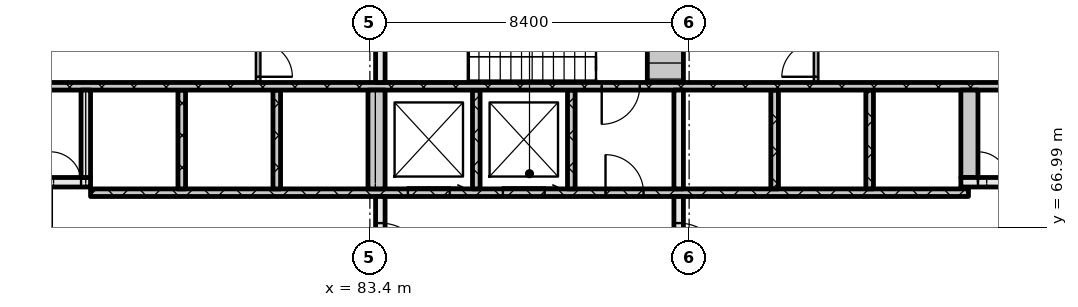
"""IFC4 building model, lengths in metres.
Left out: names, types, materials, properties, quantities, classifications, styles, units other than length and angle.
Written with IfcOpenShell. Run it as: python <this file> out.ifc"""

import sys

from ifc_helpers import new_model, si_unit, direction, frame, frame_2d, origin, place, context, subcontext, project, spatial, rectangle, extrude, element, fill, save


model = new_model("IFC4")
c1 = context("Model", 3, precision=1e-05, world=origin(), true_north=direction((0.0, 1.0)))
c2 = subcontext(c1, "Body", "Model", "MODEL_VIEW")
j1 = project(units=[si_unit("LENGTHUNIT", "METRE"), si_unit("PLANEANGLEUNIT", "RADIAN")], contexts=[c1])
p1 = place(None, origin())
s1 = spatial("IfcSite", under=j1, at=p1, CompositionType="ELEMENT")
p2 = place(p1, origin())
s2 = spatial("IfcBuilding", under=s1, at=p2, CompositionType="ELEMENT")
p3 = place(p2, frame((0.0, 0.0, 14.4)))
s3 = spatial("IfcBuildingStorey", under=s2, at=p3, CompositionType="ELEMENT", Elevation=14.4)
p4 = place(p3, frame((83.675, 65.2, 0.0), z_axis=(0.0, 0.0, 1.0), x_axis=(0.0, 1.0, 0.0)))
e1 = element("IfcWall", 1, at=p4, inside=s3, PredefinedType="SOLIDWALL", context=c2, shape_type="SweptSolid", body=[
    extrude(rectangle(XDim=2.6, YDim=0.25, at=frame_2d((1.3, 0.0))), origin(), (0.0, 0.0, 1.0), 4.5),
])
p5 = place(p4, frame((0.7, 0.0, 0.0)))
e2 = element("IfcOpeningElement", 2, at=p5, cuts=e1, PredefinedType="OPENING", context=c2, shape_type="SweptSolid", body=[
    extrude(rectangle(XDim=1.2, YDim=2.1, at=frame_2d((0.6, 1.05))), frame((0.0, 0.135, 0.0), z_axis=(0.0, -1.0, 0.0), x_axis=(1.0, 0.0, 0.0)), (0.0, 0.0, 1.0), 0.27),
])
p6 = place(p3, frame((91.525, 65.2, 0.0), z_axis=(0.0, 0.0, 1.0), x_axis=(0.0, 1.0, 0.0)))
e3 = element("IfcWall", 3, at=p6, inside=s3, PredefinedType="SOLIDWALL", context=c2, shape_type="SweptSolid", body=[
    extrude(rectangle(XDim=2.6, YDim=0.25, at=frame_2d((1.3, 0.0))), origin(), (0.0, 0.0, 1.0), 4.5),
])
p7 = place(p6, frame((0.7, 0.0, 0.0)))
e4 = element("IfcOpeningElement", 4, at=p7, cuts=e3, PredefinedType="OPENING", context=c2, shape_type="SweptSolid", body=[
    extrude(rectangle(XDim=1.2, YDim=2.1, at=frame_2d((0.6, 1.05))), frame((0.0, 0.135, 0.0), z_axis=(0.0, -1.0, 0.0), x_axis=(1.0, 0.0, 0.0)), (0.0, 0.0, 1.0), 0.27),
])
p8 = place(p3, frame((76.05, 67.9, 0.0), z_axis=(0.0, 0.0, 1.0), x_axis=(1.0, 0.0, 0.0)))
e5 = element("IfcWall", 5, at=p8, inside=s3, PredefinedType="SOLIDWALL", context=c2, shape_type="SweptSolid", body=[
    extrude(rectangle(XDim=23.1, YDim=0.2, at=frame_2d((11.55, 0.0))), origin(), (0.0, 0.0, 1.0), 4.5),
])
p9 = place(p8, frame((8.35, 0.0, 0.0)))
e6 = element("IfcOpeningElement", 6, at=p9, cuts=e5, PredefinedType="OPENING", context=c2, shape_type="SweptSolid", body=[
    extrude(rectangle(XDim=1.1, YDim=2.1, at=frame_2d((0.55, 1.05))), frame((0.0, 0.11, 0.0), z_axis=(0.0, -1.0, 0.0), x_axis=(1.0, 0.0, 0.0)), (0.0, 0.0, 1.0), 0.22),
])
p10 = place(p8, frame((10.85, 0.0, 0.0)))
e7 = element("IfcOpeningElement", 7, at=p10, cuts=e5, PredefinedType="OPENING", context=c2, shape_type="SweptSolid", body=[
    extrude(rectangle(XDim=1.1, YDim=2.1, at=frame_2d((0.55, 1.05))), frame((0.0, 0.11, 0.0), z_axis=(0.0, -1.0, 0.0), x_axis=(1.0, 0.0, 0.0)), (0.0, 0.0, 1.0), 0.22),
])
p11 = place(p8, frame((13.55, 0.0, 0.0)))
e8 = element("IfcOpeningElement", 8, at=p11, cuts=e5, PredefinedType="OPENING", context=c2, shape_type="SweptSolid", body=[
    extrude(rectangle(XDim=1.0, YDim=2.1, at=frame_2d((0.5, 1.05))), frame((0.0, 0.11, 0.0), z_axis=(0.0, -1.0, 0.0), x_axis=(1.0, 0.0, 0.0)), (0.0, 0.0, 1.0), 0.22),
])
for number, where, z_axis, x_axis in (
    (9, (78.45, 68.0, 0.0), (0.0, 0.0, 1.0), (0.0, 1.0, 0.0)),
    (10, (80.95, 68.0, 0.0), (0.0, 0.0, 1.0), (0.0, 1.0, 0.0)),
):
    element("IfcWall", number, at=place(p3, frame(where, z_axis=z_axis, x_axis=x_axis)), inside=s3, PredefinedType="SOLIDWALL", context=c2, shape_type="SweptSolid", body=[
        extrude(rectangle(XDim=2.6, YDim=0.2, at=frame_2d((1.3, 0.0))), origin(), (0.0, 0.0, 1.0), 4.5),
    ])
p12 = place(p3, frame((83.575, 68.0, 0.0), z_axis=(0.0, 0.0, 1.0), x_axis=(0.0, 1.0, 0.0)))
e11 = element("IfcWall", 11, at=p12, inside=s3, PredefinedType="SOLIDWALL", context=c2, shape_type="SweptSolid", body=[
    extrude(rectangle(XDim=2.6, YDim=0.45, at=frame_2d((1.3, 0.0))), origin(), (0.0, 0.0, 1.0), 4.5),
])
for number, where, z_axis, x_axis in (
    (12, (86.2, 68.0, 0.0), (0.0, 0.0, 1.0), (0.0, 1.0, 0.0)),
    (13, (88.7, 68.0, 0.0), (0.0, 0.0, 1.0), (0.0, 1.0, 0.0)),
):
    element("IfcWall", number, at=place(p3, frame(where, z_axis=z_axis, x_axis=x_axis)), inside=s3, PredefinedType="SOLIDWALL", context=c2, shape_type="SweptSolid", body=[
        extrude(rectangle(XDim=2.6, YDim=0.2, at=frame_2d((1.3, 0.0))), origin(), (0.0, 0.0, 1.0), 4.5),
    ])
p13 = place(p3, frame((91.525, 68.0, 0.0), z_axis=(0.0, 0.0, 1.0), x_axis=(0.0, 1.0, 0.0)))
e14 = element("IfcWall", 14, at=p13, inside=s3, PredefinedType="SOLIDWALL", context=c2, shape_type="SweptSolid", body=[
    extrude(rectangle(XDim=2.6, YDim=0.25, at=frame_2d((1.3, 0.0))), origin(), (0.0, 0.0, 1.0), 4.5),
])
for number, where, z_axis, x_axis in (
    (15, (94.05, 68.0, 0.0), (0.0, 0.0, 1.0), (0.0, 1.0, 0.0)),
    (16, (96.55, 68.0, 0.0), (0.0, 0.0, 1.0), (0.0, 1.0, 0.0)),
):
    element("IfcWall", number, at=place(p3, frame(where, z_axis=z_axis, x_axis=x_axis)), inside=s3, PredefinedType="SOLIDWALL", context=c2, shape_type="SweptSolid", body=[
        extrude(rectangle(XDim=2.6, YDim=0.2, at=frame_2d((1.3, 0.0))), origin(), (0.0, 0.0, 1.0), 4.5),
    ])
p14 = place(p3, frame((98.95, 68.025, 0.0), z_axis=(0.0, 0.0, 1.0), x_axis=(1.0, 0.0, 0.0)))
e17 = element("IfcWall", 17, at=p14, inside=s3, PredefinedType="SOLIDWALL", context=c2, shape_type="SweptSolid", body=[
    extrude(rectangle(XDim=0.2, YDim=0.05, at=frame_2d((0.1, 0.0))), origin(), (0.0, 0.0, 1.0), 4.5),
])
p15 = place(p3, frame((67.8, 68.175, 0.0), z_axis=(0.0, 0.0, 1.0), x_axis=(1.0, 0.0, 0.0)))
e18 = element("IfcWall", 18, at=p15, inside=s3, PredefinedType="SOLIDWALL", context=c2, shape_type="SweptSolid", body=[
    extrude(rectangle(XDim=8.25, YDim=0.25, at=frame_2d((4.125, 0.0))), origin(), (0.0, 0.0, 1.0), 4.5),
])
p16 = place(p15, frame((5.7, 0.0, 0.0)))
e19 = element("IfcOpeningElement", 19, at=p16, cuts=e18, PredefinedType="OPENING", context=c2, shape_type="SweptSolid", body=[
    extrude(rectangle(XDim=1.0, YDim=2.1, at=frame_2d((0.5, 1.05))), frame((0.0, 0.135, 0.0), z_axis=(0.0, -1.0, 0.0), x_axis=(1.0, 0.0, 0.0)), (0.0, 0.0, 1.0), 0.27),
])
p17 = place(p15, frame((7.2, 0.0, 0.0)))
e20 = element("IfcOpeningElement", 20, at=p17, cuts=e18, PredefinedType="OPENING", context=c2, shape_type="SweptSolid", body=[
    extrude(rectangle(XDim=0.8, YDim=2.1, at=frame_2d((0.4, 1.05))), frame((0.0, 0.135, 0.0), z_axis=(0.0, -1.0, 0.0), x_axis=(1.0, 0.0, 0.0)), (0.0, 0.0, 1.0), 0.27),
])
p18 = place(p3, frame((98.95, 68.175, 0.0), z_axis=(0.0, 0.0, 1.0), x_axis=(1.0, 0.0, 0.0)))
e21 = element("IfcWall", 21, at=p18, inside=s3, PredefinedType="SOLIDWALL", context=c2, shape_type="SweptSolid", body=[
    extrude(rectangle(XDim=8.45, YDim=0.25, at=frame_2d((4.225, 0.0))), origin(), (0.0, 0.0, 1.0), 4.5),
])
p19 = place(p18, frame((0.45, 0.0, 0.0)))
e22 = element("IfcOpeningElement", 22, at=p19, cuts=e21, PredefinedType="OPENING", context=c2, shape_type="SweptSolid", body=[
    extrude(rectangle(XDim=0.8, YDim=2.1, at=frame_2d((0.4, 1.05))), frame((0.0, 0.135, 0.0), z_axis=(0.0, -1.0, 0.0), x_axis=(1.0, 0.0, 0.0)), (0.0, 0.0, 1.0), 0.27),
])
p20 = place(p18, frame((1.75, 0.0, 0.0)))
e23 = element("IfcOpeningElement", 23, at=p20, cuts=e21, PredefinedType="OPENING", context=c2, shape_type="SweptSolid", body=[
    extrude(rectangle(XDim=1.0, YDim=2.1, at=frame_2d((0.5, 1.05))), frame((0.0, 0.135, 0.0), z_axis=(0.0, -1.0, 0.0), x_axis=(1.0, 0.0, 0.0)), (0.0, 0.0, 1.0), 0.27),
])
p21 = place(p3, frame((75.925, 68.3, 0.0), z_axis=(0.0, 0.0, 1.0), x_axis=(0.0, 1.0, 0.0)))
e24 = element("IfcWall", 24, at=p21, inside=s3, PredefinedType="SOLIDWALL", context=c2, shape_type="SweptSolid", body=[
    extrude(rectangle(XDim=2.3, YDim=0.25, at=frame_2d((1.15, 0.0))), origin(), (0.0, 0.0, 1.0), 4.5),
])
p22 = place(p3, frame((99.175, 68.3, 0.0), z_axis=(0.0, 0.0, 1.0), x_axis=(0.0, 1.0, 0.0)))
e25 = element("IfcWall", 25, at=p22, inside=s3, PredefinedType="SOLIDWALL", context=c2, shape_type="SweptSolid", body=[
    extrude(rectangle(XDim=2.3, YDim=0.45, at=frame_2d((1.15, 0.0))), origin(), (0.0, 0.0, 1.0), 4.5),
])
p23 = place(p3, frame((67.8, 70.7, 0.0), z_axis=(0.0, 0.0, 1.0), x_axis=(1.0, 0.0, 0.0)))
e26 = element("IfcWall", 26, at=p23, inside=s3, PredefinedType="SOLIDWALL", context=c2, shape_type="SweptSolid", body=[
    extrude(rectangle(XDim=39.6, YDim=0.2, at=frame_2d((19.8, 0.0))), origin(), (0.0, 0.0, 1.0), 4.5),
])
p24 = place(p23, frame((0.65, 0.0, 0.0)))
e27 = element("IfcOpeningElement", 27, at=p24, cuts=e26, PredefinedType="OPENING", context=c2, shape_type="SweptSolid", body=[
    extrude(rectangle(XDim=1.1, YDim=2.1, at=frame_2d((0.55, 1.05))), frame((0.0, 0.11, 0.0), z_axis=(0.0, -1.0, 0.0), x_axis=(1.0, 0.0, 0.0)), (0.0, 0.0, 1.0), 0.22),
])
p25 = place(p23, frame((3.25, 0.0, 0.0)))
e28 = element("IfcOpeningElement", 28, at=p25, cuts=e26, PredefinedType="OPENING", context=c2, shape_type="SweptSolid", body=[
    extrude(rectangle(XDim=1.1, YDim=2.1, at=frame_2d((0.55, 1.05))), frame((0.0, 0.11, 0.0), z_axis=(0.0, -1.0, 0.0), x_axis=(1.0, 0.0, 0.0)), (0.0, 0.0, 1.0), 0.22),
])
p26 = place(p23, frame((5.9, 0.0, 0.0)))
e29 = element("IfcOpeningElement", 29, at=p26, cuts=e26, PredefinedType="OPENING", context=c2, shape_type="SweptSolid", body=[
    extrude(rectangle(XDim=1.0, YDim=2.1, at=frame_2d((0.5, 1.05))), frame((0.0, 0.11, 0.0), z_axis=(0.0, -1.0, 0.0), x_axis=(1.0, 0.0, 0.0)), (0.0, 0.0, 1.0), 0.22),
])
p27 = place(p23, frame((21.7, 0.0, 0.0)))
e30 = element("IfcOpeningElement", 30, at=p27, cuts=e26, PredefinedType="OPENING", context=c2, shape_type="SweptSolid", body=[
    extrude(rectangle(XDim=1.0, YDim=2.1, at=frame_2d((0.5, 1.05))), frame((0.0, 0.11, 0.0), z_axis=(0.0, -1.0, 0.0), x_axis=(1.0, 0.0, 0.0)), (0.0, 0.0, 1.0), 0.22),
])
p28 = place(p23, frame((32.7, 0.0, 0.0)))
e31 = element("IfcOpeningElement", 31, at=p28, cuts=e26, PredefinedType="OPENING", context=c2, shape_type="SweptSolid", body=[
    extrude(rectangle(XDim=1.0, YDim=2.1, at=frame_2d((0.5, 1.05))), frame((0.0, 0.11, 0.0), z_axis=(0.0, -1.0, 0.0), x_axis=(1.0, 0.0, 0.0)), (0.0, 0.0, 1.0), 0.22),
])
p29 = place(p23, frame((35.25, 0.0, 0.0)))
e32 = element("IfcOpeningElement", 32, at=p29, cuts=e26, PredefinedType="OPENING", context=c2, shape_type="SweptSolid", body=[
    extrude(rectangle(XDim=1.1, YDim=2.1, at=frame_2d((0.55, 1.05))), frame((0.0, 0.11, 0.0), z_axis=(0.0, -1.0, 0.0), x_axis=(1.0, 0.0, 0.0)), (0.0, 0.0, 1.0), 0.22),
])
p30 = place(p23, frame((37.85, 0.0, 0.0)))
e33 = element("IfcOpeningElement", 33, at=p30, cuts=e26, PredefinedType="OPENING", context=c2, shape_type="SweptSolid", body=[
    extrude(rectangle(XDim=1.1, YDim=2.1, at=frame_2d((0.55, 1.05))), frame((0.0, 0.11, 0.0), z_axis=(0.0, -1.0, 0.0), x_axis=(1.0, 0.0, 0.0)), (0.0, 0.0, 1.0), 0.22),
])
p31 = place(p3, frame((80.46, 70.8, 0.0), z_axis=(0.0, 0.0, 1.0), x_axis=(0.0, 1.0, 0.0)))
e34 = element("IfcWall", 34, at=p31, inside=s3, PredefinedType="PARTITIONING", context=c2, shape_type="SweptSolid", body=[
    extrude(rectangle(XDim=1.2, YDim=0.12, at=frame_2d((0.6, 0.0))), origin(), (0.0, 0.0, 1.0), 4.5),
])
p32 = place(p31, frame((0.15, 0.0, 0.0)))
e35 = element("IfcOpeningElement", 35, at=p32, cuts=e34, PredefinedType="OPENING", context=c2, shape_type="SweptSolid", body=[
    extrude(rectangle(XDim=0.9, YDim=2.1, at=frame_2d((0.45, 1.05))), frame((0.0, 0.07, 0.0), z_axis=(0.0, -1.0, 0.0), x_axis=(1.0, 0.0, 0.0)), (0.0, 0.0, 1.0), 0.14),
])
p33 = place(p3, frame((83.675, 70.8, 0.0), z_axis=(0.0, 0.0, 1.0), x_axis=(0.0, 1.0, 0.0)))
e36 = element("IfcWall", 36, at=p33, inside=s3, PredefinedType="SOLIDWALL", context=c2, shape_type="SweptSolid", body=[
    extrude(rectangle(XDim=2.95, YDim=0.25, at=frame_2d((1.475, 0.0))), origin(), (0.0, 0.0, 1.0), 4.5),
])
p34 = place(p3, frame((91.175, 70.8, 0.0), z_axis=(0.0, 0.0, 1.0), x_axis=(0.0, 1.0, 0.0)))
e37 = element("IfcWall", 37, at=p34, inside=s3, PredefinedType="SOLIDWALL", context=c2, shape_type="SweptSolid", body=[
    extrude(rectangle(XDim=2.95, YDim=0.95, at=frame_2d((1.475, 0.0))), origin(), (0.0, 0.0, 1.0), 4.5),
])
p35 = place(p3, frame((95.14, 70.8, 0.0), z_axis=(0.0, 0.0, 1.0), x_axis=(0.0, 1.0, 0.0)))
e38 = element("IfcWall", 38, at=p35, inside=s3, PredefinedType="PARTITIONING", context=c2, shape_type="SweptSolid", body=[
    extrude(rectangle(XDim=1.2, YDim=0.12, at=frame_2d((0.6, 0.0))), origin(), (0.0, 0.0, 1.0), 4.5),
])
p36 = place(p35, frame((0.15, 0.0, 0.0)))
e39 = element("IfcOpeningElement", 39, at=p36, cuts=e38, PredefinedType="OPENING", context=c2, shape_type="SweptSolid", body=[
    extrude(rectangle(XDim=0.9, YDim=2.1, at=frame_2d((0.45, 1.05))), frame((0.0, 0.07, 0.0), z_axis=(0.0, -1.0, 0.0), x_axis=(1.0, 0.0, 0.0)), (0.0, 0.0, 1.0), 0.14),
])
p37 = place(p5, origin())
e40 = element("IfcDoor", 40, at=p37, inside=s3, OperationType="SINGLE_SWING_RIGHT", PredefinedType="DOOR", context=c2, shape_type="SweptSolid", body=[
    extrude(rectangle(XDim=1.2, YDim=2.1, at=frame_2d((0.6, 1.05))), frame((0.0, 0.025, 0.0), z_axis=(0.0, -1.0, 0.0), x_axis=(1.0, 0.0, 0.0)), (0.0, 0.0, 1.0), 0.05),
])
fill(e2, e40)
p38 = place(p7, origin())
e41 = element("IfcDoor", 41, at=p38, inside=s3, OperationType="SINGLE_SWING_RIGHT", PredefinedType="DOOR", context=c2, shape_type="SweptSolid", body=[
    extrude(rectangle(XDim=1.2, YDim=2.1, at=frame_2d((0.6, 1.05))), frame((0.0, 0.025, 0.0), z_axis=(0.0, -1.0, 0.0), x_axis=(1.0, 0.0, 0.0)), (0.0, 0.0, 1.0), 0.05),
])
fill(e4, e41)
p39 = place(p9, origin())
e42 = element("IfcDoor", 42, at=p39, inside=s3, OperationType="SLIDING_TO_RIGHT", PredefinedType="DOOR", context=c2, shape_type="SweptSolid", body=[
    extrude(rectangle(XDim=1.1, YDim=2.1, at=frame_2d((0.55, 1.05))), frame((0.0, 0.025, 0.0), z_axis=(0.0, -1.0, 0.0), x_axis=(1.0, 0.0, 0.0)), (0.0, 0.0, 1.0), 0.05),
])
fill(e6, e42)
p40 = place(p10, origin())
e43 = element("IfcDoor", 43, at=p40, inside=s3, OperationType="SLIDING_TO_RIGHT", PredefinedType="DOOR", context=c2, shape_type="SweptSolid", body=[
    extrude(rectangle(XDim=1.1, YDim=2.1, at=frame_2d((0.55, 1.05))), frame((0.0, 0.025, 0.0), z_axis=(0.0, -1.0, 0.0), x_axis=(1.0, 0.0, 0.0)), (0.0, 0.0, 1.0), 0.05),
])
fill(e7, e43)
p41 = place(p11, origin())
e44 = element("IfcDoor", 44, at=p41, inside=s3, OperationType="SINGLE_SWING_LEFT", PredefinedType="DOOR", context=c2, shape_type="SweptSolid", body=[
    extrude(rectangle(XDim=1.0, YDim=2.1, at=frame_2d((0.5, 1.05))), frame((0.0, 0.025, 0.0), z_axis=(0.0, -1.0, 0.0), x_axis=(1.0, 0.0, 0.0)), (0.0, 0.0, 1.0), 0.05),
])
fill(e8, e44)
p42 = place(p17, origin())
e45 = element("IfcDoor", 45, at=p42, inside=s3, OperationType="SINGLE_SWING_LEFT", PredefinedType="DOOR", context=c2, shape_type="SweptSolid", body=[
    extrude(rectangle(XDim=0.8, YDim=2.1, at=frame_2d((0.4, 1.05))), frame((0.0, 0.025, 0.0), z_axis=(0.0, -1.0, 0.0), x_axis=(1.0, 0.0, 0.0)), (0.0, 0.0, 1.0), 0.05),
])
fill(e20, e45)
p43 = place(p19, origin())
e46 = element("IfcDoor", 46, at=p43, inside=s3, OperationType="SINGLE_SWING_LEFT", PredefinedType="DOOR", context=c2, shape_type="SweptSolid", body=[
    extrude(rectangle(XDim=0.8, YDim=2.1, at=frame_2d((0.4, 1.05))), frame((0.0, 0.025, 0.0), z_axis=(0.0, -1.0, 0.0), x_axis=(1.0, 0.0, 0.0)), (0.0, 0.0, 1.0), 0.05),
])
fill(e22, e46)
p44 = place(p27, origin())
e47 = element("IfcDoor", 47, at=p44, inside=s3, OperationType="SINGLE_SWING_RIGHT", PredefinedType="DOOR", context=c2, shape_type="SweptSolid", body=[
    extrude(rectangle(XDim=1.0, YDim=2.1, at=frame_2d((0.5, 1.05))), frame((0.0, 0.025, 0.0), z_axis=(0.0, -1.0, 0.0), x_axis=(1.0, 0.0, 0.0)), (0.0, 0.0, 1.0), 0.05),
])
fill(e30, e47)
p45 = place(p32, origin())
e48 = element("IfcDoor", 48, at=p45, inside=s3, OperationType="SINGLE_SWING_RIGHT", PredefinedType="DOOR", context=c2, shape_type="SweptSolid", body=[
    extrude(rectangle(XDim=0.9, YDim=2.1, at=frame_2d((0.45, 1.05))), frame((0.0, 0.025, 0.0), z_axis=(0.0, -1.0, 0.0), x_axis=(1.0, 0.0, 0.0)), (0.0, 0.0, 1.0), 0.05),
])
fill(e35, e48)
p46 = place(p36, origin())
e49 = element("IfcDoor", 49, at=p46, inside=s3, OperationType="SINGLE_SWING_LEFT", PredefinedType="DOOR", context=c2, shape_type="SweptSolid", body=[
    extrude(rectangle(XDim=0.9, YDim=2.1, at=frame_2d((0.45, 1.05))), frame((0.0, 0.025, 0.0), z_axis=(0.0, -1.0, 0.0), x_axis=(1.0, 0.0, 0.0)), (0.0, 0.0, 1.0), 0.05),
])
fill(e39, e49)
save(model, sys.argv[1])
